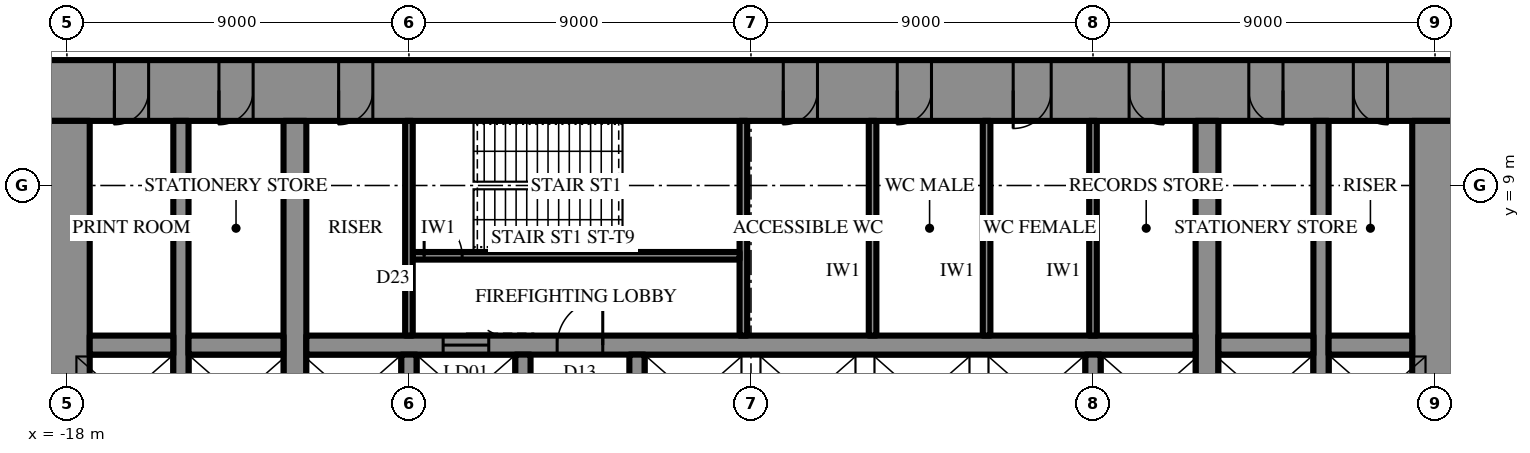
"""IFC4 building model, lengths in metres.
Left out: names, types, materials, properties, quantities, classifications, styles, units other than length and angle.
Written with IfcOpenShell. Run it as: python <this file> out.ifc"""

import sys

from ifc_helpers import new_model, si_unit, direction, frame, frame_2d, origin, place, context, subcontext, project, spatial, rectangle, extrude, element, fill, save


model = new_model("IFC4")
c1 = context("Model", 3, precision=1e-05, world=origin(), true_north=direction((0.0, 1.0)))
c2 = subcontext(c1, "Body", "Model", "MODEL_VIEW")
j1 = project(units=[si_unit("LENGTHUNIT", "METRE"), si_unit("PLANEANGLEUNIT", "RADIAN")], contexts=[c1])
p1 = place(None, origin())
s1 = spatial("IfcSite", under=j1, at=p1, CompositionType="ELEMENT")
p2 = place(p1, origin())
s2 = spatial("IfcBuilding", under=s1, at=p2, CompositionType="ELEMENT")
p3 = place(p2, frame((0.0, 0.0, 18.5)))
s3 = spatial("IfcBuildingStorey", under=s2, at=p3, CompositionType="ELEMENT", Elevation=18.5)
p4 = place(p3, frame((-18.6, 11.5, 0.0), z_axis=(0.0, 0.0, 1.0), x_axis=(1.0, 0.0, 0.0)))
e1 = element("IfcWall", 1, at=p4, inside=s3, PredefinedType="SHEAR", context=c2, shape_type="SweptSolid", body=[
    extrude(rectangle(XDim=37.2, YDim=1.6, at=frame_2d((18.6, 0.0))), origin(), (0.0, 0.0, 1.0), 5.0),
])
p5 = place(p4, frame((19.45, 0.0, 0.0)))
e2 = element("IfcOpeningElement", 2, at=p5, cuts=e1, PredefinedType="OPENING", context=c2, shape_type="SweptSolid", body=[
    extrude(rectangle(XDim=0.9, YDim=2.2, at=frame_2d((0.45, 1.1))), frame((0.0, 0.81, 0.0), z_axis=(0.0, -1.0, 0.0), x_axis=(1.0, 0.0, 0.0)), (0.0, 0.0, 1.0), 1.62),
])
p6 = place(p4, frame((22.45, 0.0, 0.0)))
e3 = element("IfcOpeningElement", 3, at=p6, cuts=e1, PredefinedType="OPENING", context=c2, shape_type="SweptSolid", body=[
    extrude(rectangle(XDim=0.9, YDim=2.2, at=frame_2d((0.45, 1.1))), frame((0.0, 0.81, 0.0), z_axis=(0.0, -1.0, 0.0), x_axis=(1.0, 0.0, 0.0)), (0.0, 0.0, 1.0), 1.62),
])
p7 = place(p4, frame((25.5, 0.0, 0.0)))
e4 = element("IfcOpeningElement", 4, at=p7, cuts=e1, PredefinedType="OPENING", context=c2, shape_type="SweptSolid", body=[
    extrude(rectangle(XDim=1.0, YDim=2.2, at=frame_2d((0.5, 1.1))), frame((0.0, 0.81, 0.0), z_axis=(0.0, -1.0, 0.0), x_axis=(1.0, 0.0, 0.0)), (0.0, 0.0, 1.0), 1.62),
])
p8 = place(p4, frame((1.85, 0.0, 0.0)))
e5 = element("IfcOpeningElement", 5, at=p8, cuts=e1, PredefinedType="OPENING", context=c2, shape_type="SweptSolid", body=[
    extrude(rectangle(XDim=0.9, YDim=2.2, at=frame_2d((0.45, 1.1))), frame((0.0, 0.81, 0.0), z_axis=(0.0, -1.0, 0.0), x_axis=(1.0, 0.0, 0.0)), (0.0, 0.0, 1.0), 1.62),
])
p9 = place(p4, frame((4.6, 0.0, 0.0)))
e6 = element("IfcOpeningElement", 6, at=p9, cuts=e1, PredefinedType="OPENING", context=c2, shape_type="SweptSolid", body=[
    extrude(rectangle(XDim=0.9, YDim=2.2, at=frame_2d((0.45, 1.1))), frame((0.0, 0.81, 0.0), z_axis=(0.0, -1.0, 0.0), x_axis=(1.0, 0.0, 0.0)), (0.0, 0.0, 1.0), 1.62),
])
p10 = place(p4, frame((7.75, 0.0, 0.0)))
e7 = element("IfcOpeningElement", 7, at=p10, cuts=e1, PredefinedType="OPENING", context=c2, shape_type="SweptSolid", body=[
    extrude(rectangle(XDim=0.9, YDim=2.2, at=frame_2d((0.45, 1.1))), frame((0.0, 0.81, 0.0), z_axis=(0.0, -1.0, 0.0), x_axis=(1.0, 0.0, 0.0)), (0.0, 0.0, 1.0), 1.62),
])
p11 = place(p4, frame((28.55, 0.0, 0.0)))
e8 = element("IfcOpeningElement", 8, at=p11, cuts=e1, PredefinedType="OPENING", context=c2, shape_type="SweptSolid", body=[
    extrude(rectangle(XDim=0.9, YDim=2.2, at=frame_2d((0.45, 1.1))), frame((0.0, 0.81, 0.0), z_axis=(0.0, -1.0, 0.0), x_axis=(1.0, 0.0, 0.0)), (0.0, 0.0, 1.0), 1.62),
])
p12 = place(p4, frame((31.7, 0.0, 0.0)))
e9 = element("IfcOpeningElement", 9, at=p12, cuts=e1, PredefinedType="OPENING", context=c2, shape_type="SweptSolid", body=[
    extrude(rectangle(XDim=0.9, YDim=2.2, at=frame_2d((0.45, 1.1))), frame((0.0, 0.81, 0.0), z_axis=(0.0, -1.0, 0.0), x_axis=(1.0, 0.0, 0.0)), (0.0, 0.0, 1.0), 1.62),
])
p13 = place(p4, frame((34.45, 0.0, 0.0)))
e10 = element("IfcOpeningElement", 10, at=p13, cuts=e1, PredefinedType="OPENING", context=c2, shape_type="SweptSolid", body=[
    extrude(rectangle(XDim=0.9, YDim=2.2, at=frame_2d((0.45, 1.1))), frame((0.0, 0.81, 0.0), z_axis=(0.0, -1.0, 0.0), x_axis=(1.0, 0.0, 0.0)), (0.0, 0.0, 1.0), 1.62),
])
p14 = place(p3, frame((18.0, -10.7, 0.0), z_axis=(0.0, 0.0, 1.0), x_axis=(0.0, 1.0, 0.0)))
e11 = element("IfcWall", 11, at=p14, inside=s3, PredefinedType="SHEAR", context=c2, shape_type="SweptSolid", body=[
    extrude(rectangle(XDim=21.4, YDim=1.2, at=frame_2d((10.7, 0.0))), origin(), (0.0, 0.0, 1.0), 5.0),
])
p15 = place(p14, frame((9.8, 0.0, 0.0)))
e12 = element("IfcOpeningElement", 12, at=p15, cuts=e11, PredefinedType="OPENING", context=c2, shape_type="SweptSolid", body=[
    extrude(rectangle(XDim=1.8, YDim=2.4, at=frame_2d((0.9, 1.2))), frame((0.0, 0.61, 0.0), z_axis=(0.0, -1.0, 0.0), x_axis=(1.0, 0.0, 0.0)), (0.0, 0.0, 1.0), 1.22),
])
p16 = place(p3, frame((-18.0, 10.7, 0.0), z_axis=(0.0, 0.0, 1.0), x_axis=(0.0, -1.0, 0.0)))
e13 = element("IfcWall", 13, at=p16, inside=s3, PredefinedType="SHEAR", context=c2, shape_type="SweptSolid", body=[
    extrude(rectangle(XDim=21.4, YDim=1.2, at=frame_2d((10.7, 0.0))), origin(), (0.0, 0.0, 1.0), 5.0),
])
p17 = place(p16, frame((9.8, 0.0, 0.0)))
e14 = element("IfcOpeningElement", 14, at=p17, cuts=e13, PredefinedType="OPENING", context=c2, shape_type="SweptSolid", body=[
    extrude(rectangle(XDim=1.8, YDim=2.4, at=frame_2d((0.9, 1.2))), frame((0.0, 0.61, 0.0), z_axis=(0.0, -1.0, 0.0), x_axis=(1.0, 0.0, 0.0)), (0.0, 0.0, 1.0), 1.22),
])
p18 = place(p3, frame((12.0, -10.7, 0.0), z_axis=(0.0, 0.0, 1.0), x_axis=(0.0, 1.0, 0.0)))
e15 = element("IfcWall", 15, at=p18, inside=s3, PredefinedType="SHEAR", context=c2, shape_type="SweptSolid", body=[
    extrude(rectangle(XDim=21.4, YDim=0.6, at=frame_2d((10.7, 0.0))), origin(), (0.0, 0.0, 1.0), 5.0),
])
p19 = place(p18, frame((9.8, 0.0, 0.0)))
e16 = element("IfcOpeningElement", 16, at=p19, cuts=e15, PredefinedType="OPENING", context=c2, shape_type="SweptSolid", body=[
    extrude(rectangle(XDim=1.8, YDim=2.4, at=frame_2d((0.9, 1.2))), frame((0.0, 0.31, 0.0), z_axis=(0.0, -1.0, 0.0), x_axis=(1.0, 0.0, 0.0)), (0.0, 0.0, 1.0), 0.62),
])
p20 = place(p3, frame((-12.0, -10.7, 0.0), z_axis=(0.0, 0.0, 1.0), x_axis=(0.0, 1.0, 0.0)))
e17 = element("IfcWall", 17, at=p20, inside=s3, PredefinedType="SHEAR", context=c2, shape_type="SweptSolid", body=[
    extrude(rectangle(XDim=21.4, YDim=0.6, at=frame_2d((10.7, 0.0))), origin(), (0.0, 0.0, 1.0), 5.0),
])
p21 = place(p20, frame((9.8, 0.0, 0.0)))
e18 = element("IfcOpeningElement", 18, at=p21, cuts=e17, PredefinedType="OPENING", context=c2, shape_type="SweptSolid", body=[
    extrude(rectangle(XDim=1.8, YDim=2.4, at=frame_2d((0.9, 1.2))), frame((0.0, 0.31, 0.0), z_axis=(0.0, -1.0, 0.0), x_axis=(1.0, 0.0, 0.0)), (0.0, 0.0, 1.0), 0.62),
])
p22 = place(p3, frame((15.0, -10.7, 0.0), z_axis=(0.0, 0.0, 1.0), x_axis=(0.0, 1.0, 0.0)))
e19 = element("IfcWall", 19, at=p22, inside=s3, PredefinedType="SHEAR", context=c2, shape_type="SweptSolid", body=[
    extrude(rectangle(XDim=21.4, YDim=0.4, at=frame_2d((10.7, 0.0))), origin(), (0.0, 0.0, 1.0), 5.0),
])
p23 = place(p22, frame((9.8, 0.0, 0.0)))
e20 = element("IfcOpeningElement", 20, at=p23, cuts=e19, PredefinedType="OPENING", context=c2, shape_type="SweptSolid", body=[
    extrude(rectangle(XDim=1.8, YDim=2.4, at=frame_2d((0.9, 1.2))), frame((0.0, 0.21, 0.0), z_axis=(0.0, -1.0, 0.0), x_axis=(1.0, 0.0, 0.0)), (0.0, 0.0, 1.0), 0.42),
])
p24 = place(p3, frame((-15.0, -10.7, 0.0), z_axis=(0.0, 0.0, 1.0), x_axis=(0.0, 1.0, 0.0)))
e21 = element("IfcWall", 21, at=p24, inside=s3, PredefinedType="SHEAR", context=c2, shape_type="SweptSolid", body=[
    extrude(rectangle(XDim=21.4, YDim=0.4, at=frame_2d((10.7, 0.0))), origin(), (0.0, 0.0, 1.0), 5.0),
])
p25 = place(p24, frame((9.8, 0.0, 0.0)))
e22 = element("IfcOpeningElement", 22, at=p25, cuts=e21, PredefinedType="OPENING", context=c2, shape_type="SweptSolid", body=[
    extrude(rectangle(XDim=1.8, YDim=2.4, at=frame_2d((0.9, 1.2))), frame((0.0, 0.21, 0.0), z_axis=(0.0, -1.0, 0.0), x_axis=(1.0, 0.0, 0.0)), (0.0, 0.0, 1.0), 0.42),
])
p26 = place(p3, frame((-17.4, 4.8, 0.0), z_axis=(0.0, 0.0, 1.0), x_axis=(1.0, 0.0, 0.0)))
e23 = element("IfcWall", 23, at=p26, inside=s3, PredefinedType="SHEAR", context=c2, shape_type="SweptSolid", body=[
    extrude(rectangle(XDim=2.2, YDim=0.5, at=frame_2d((1.1, 0.0))), origin(), (0.0, 0.0, 1.0), 5.0),
])
p27 = place(p3, frame((-14.8, 4.8, 0.0), z_axis=(0.0, 0.0, 1.0), x_axis=(1.0, 0.0, 0.0)))
e24 = element("IfcWall", 24, at=p27, inside=s3, PredefinedType="SHEAR", context=c2, shape_type="SweptSolid", body=[
    extrude(rectangle(XDim=2.5, YDim=0.5, at=frame_2d((1.25, 0.0))), origin(), (0.0, 0.0, 1.0), 5.0),
])
p28 = place(p3, frame((-11.7, 4.8, 0.0), z_axis=(0.0, 0.0, 1.0), x_axis=(1.0, 0.0, 0.0)))
e25 = element("IfcWall", 25, at=p28, inside=s3, PredefinedType="SHEAR", context=c2, shape_type="SweptSolid", body=[
    extrude(rectangle(XDim=23.4, YDim=0.5, at=frame_2d((11.7, 0.0))), origin(), (0.0, 0.0, 1.0), 5.0),
])
p29 = place(p28, frame((6.6, 0.0, 0.0)))
e26 = element("IfcOpeningElement", 26, at=p29, cuts=e25, PredefinedType="OPENING", context=c2, shape_type="SweptSolid", body=[
    extrude(rectangle(XDim=1.2, YDim=2.2, at=frame_2d((0.6, 1.1))), frame((0.0, 0.26, 0.0), z_axis=(0.0, -1.0, 0.0), x_axis=(1.0, 0.0, 0.0)), (0.0, 0.0, 1.0), 0.52),
])
p30 = place(p28, frame((3.6, 0.0, 0.0)))
e27 = element("IfcOpeningElement", 27, at=p30, cuts=e25, PredefinedType="OPENING", context=c2, shape_type="SweptSolid", body=[
    extrude(rectangle(XDim=1.2, YDim=2.2, at=frame_2d((0.6, 1.1))), frame((0.0, 0.26, 0.0), z_axis=(0.0, -1.0, 0.0), x_axis=(1.0, 0.0, 0.0)), (0.0, 0.0, 1.0), 0.52),
])
p31 = place(p3, frame((12.3, 4.8, 0.0), z_axis=(0.0, 0.0, 1.0), x_axis=(1.0, 0.0, 0.0)))
e28 = element("IfcWall", 28, at=p31, inside=s3, PredefinedType="SHEAR", context=c2, shape_type="SweptSolid", body=[
    extrude(rectangle(XDim=2.5, YDim=0.5, at=frame_2d((1.25, 0.0))), origin(), (0.0, 0.0, 1.0), 5.0),
])
p32 = place(p3, frame((15.2, 4.8, 0.0), z_axis=(0.0, 0.0, 1.0), x_axis=(1.0, 0.0, 0.0)))
e29 = element("IfcWall", 29, at=p32, inside=s3, PredefinedType="SHEAR", context=c2, shape_type="SweptSolid", body=[
    extrude(rectangle(XDim=2.2, YDim=0.5, at=frame_2d((1.1, 0.0))), origin(), (0.0, 0.0, 1.0), 5.0),
])
for number, where, z_axis, x_axis in (
    (30, (-9.0, 2.25, 0.0), (0.0, 0.0, 1.0), (0.0, 1.0, 0.0)),
    (31, (-6.0, 2.25, 0.0), (0.0, 0.0, 1.0), (0.0, 1.0, 0.0)),
    (32, (-3.0, 2.25, 0.0), (0.0, 0.0, 1.0), (0.0, 1.0, 0.0)),
    (33, (9.0, 2.25, 0.0), (0.0, 0.0, 1.0), (0.0, 1.0, 0.0)),
):
    element("IfcWall", number, at=place(p3, frame(where, z_axis=z_axis, x_axis=x_axis)), inside=s3, PredefinedType="SHEAR", context=c2, shape_type="SweptSolid", body=[
        extrude(rectangle(XDim=2.3, YDim=0.4, at=frame_2d((1.15, 0.0))), origin(), (0.0, 0.0, 1.0), 5.0),
    ])
p33 = place(p3, frame((-0.2, 5.05, 0.0), z_axis=(0.0, 0.0, 1.0), x_axis=(0.0, 1.0, 0.0)))
e34 = element("IfcWall", 34, at=p33, inside=s3, PredefinedType="SHEAR", context=c2, shape_type="SweptSolid", body=[
    extrude(rectangle(XDim=5.65, YDim=0.2, at=frame_2d((2.825, 0.0))), origin(), (0.0, 0.0, 1.0), 5.0),
])
p34 = place(p3, frame((-8.9, 7.15, 0.0), z_axis=(0.0, 0.0, 1.0), x_axis=(1.0, 0.0, 0.0)))
e35 = element("IfcWall", 35, at=p34, inside=s3, PredefinedType="SHEAR", context=c2, shape_type="SweptSolid", body=[
    extrude(rectangle(XDim=8.6, YDim=0.2, at=frame_2d((4.3, 0.0))), origin(), (0.0, 0.0, 1.0), 5.0),
])
p35 = place(p34, frame((0.3, 0.0, 0.0)))
e36 = element("IfcOpeningElement", 36, at=p35, cuts=e35, PredefinedType="OPENING", context=c2, shape_type="SweptSolid", body=[
    extrude(rectangle(XDim=1.0, YDim=2.2, at=frame_2d((0.5, 1.1))), frame((0.0, 0.11, 0.0), z_axis=(0.0, -1.0, 0.0), x_axis=(1.0, 0.0, 0.0)), (0.0, 0.0, 1.0), 0.22),
])
for number, where, z_axis, x_axis in (
    (37, (-9.0, 5.05, 0.0), (0.0, 0.0, 1.0), (0.0, 1.0, 0.0)),
    (38, (9.0, 5.05, 0.0), (0.0, 0.0, 1.0), (0.0, 1.0, 0.0)),
    (39, (3.2, 5.05, 0.0), (0.0, 0.0, 1.0), (0.0, 1.0, 0.0)),
    (40, (6.2, 5.05, 0.0), (0.0, 0.0, 1.0), (0.0, 1.0, 0.0)),
):
    element("IfcWall", number, at=place(p3, frame(where, z_axis=z_axis, x_axis=x_axis)), inside=s3, PredefinedType="PARTITIONING", context=c2, shape_type="SweptSolid", body=[
        extrude(rectangle(XDim=5.65, YDim=0.2, at=frame_2d((2.825, 0.0))), origin(), (0.0, 0.0, 1.0), 4.65),
    ])
p36 = place(p29, origin())
e41 = element("IfcDoor", 41, at=p36, inside=s3, OperationType="SINGLE_SWING_LEFT", PredefinedType="DOOR", context=c2, shape_type="SweptSolid", body=[
    extrude(rectangle(XDim=1.2, YDim=2.2, at=frame_2d((0.6, 1.1))), frame((0.0, 0.025, 0.0), z_axis=(0.0, -1.0, 0.0), x_axis=(1.0, 0.0, 0.0)), (0.0, 0.0, 1.0), 0.05),
])
fill(e26, e41)
p37 = place(p35, origin())
e42 = element("IfcDoor", 42, at=p37, inside=s3, OperationType="SINGLE_SWING_RIGHT", PredefinedType="DOOR", context=c2, shape_type="SweptSolid", body=[
    extrude(rectangle(XDim=1.0, YDim=2.2, at=frame_2d((0.5, 1.1))), frame((0.0, 0.025, 0.0), z_axis=(0.0, -1.0, 0.0), x_axis=(1.0, 0.0, 0.0)), (0.0, 0.0, 1.0), 0.05),
])
fill(e36, e42)
p38 = place(p5, frame((0.9, 0.0, 0.0), z_axis=(0.0, 0.0, 1.0), x_axis=(-1.0, 0.0, 0.0)))
e43 = element("IfcDoor", 43, at=p38, inside=s3, OperationType="SINGLE_SWING_LEFT", PredefinedType="DOOR", context=c2, shape_type="SweptSolid", body=[
    extrude(rectangle(XDim=0.9, YDim=2.2, at=frame_2d((0.45, 1.1))), frame((0.0, 0.025, 0.0), z_axis=(0.0, -1.0, 0.0), x_axis=(1.0, 0.0, 0.0)), (0.0, 0.0, 1.0), 0.05),
])
fill(e2, e43)
p39 = place(p6, frame((0.9, 0.0, 0.0), z_axis=(0.0, 0.0, 1.0), x_axis=(-1.0, 0.0, 0.0)))
e44 = element("IfcDoor", 44, at=p39, inside=s3, OperationType="SINGLE_SWING_LEFT", PredefinedType="DOOR", context=c2, shape_type="SweptSolid", body=[
    extrude(rectangle(XDim=0.9, YDim=2.2, at=frame_2d((0.45, 1.1))), frame((0.0, 0.025, 0.0), z_axis=(0.0, -1.0, 0.0), x_axis=(1.0, 0.0, 0.0)), (0.0, 0.0, 1.0), 0.05),
])
fill(e3, e44)
p40 = place(p7, frame((1.0, 0.0, 0.0), z_axis=(0.0, 0.0, 1.0), x_axis=(-1.0, 0.0, 0.0)))
e45 = element("IfcDoor", 45, at=p40, inside=s3, OperationType="SINGLE_SWING_LEFT", PredefinedType="DOOR", context=c2, shape_type="SweptSolid", body=[
    extrude(rectangle(XDim=1.0, YDim=2.2, at=frame_2d((0.5, 1.1))), frame((0.0, 0.025, 0.0), z_axis=(0.0, -1.0, 0.0), x_axis=(1.0, 0.0, 0.0)), (0.0, 0.0, 1.0), 0.05),
])
fill(e4, e45)
p41 = place(p8, frame((0.9, 0.0, 0.0), z_axis=(0.0, 0.0, 1.0), x_axis=(-1.0, 0.0, 0.0)))
e46 = element("IfcDoor", 46, at=p41, inside=s3, OperationType="SINGLE_SWING_LEFT", PredefinedType="DOOR", context=c2, shape_type="SweptSolid", body=[
    extrude(rectangle(XDim=0.9, YDim=2.2, at=frame_2d((0.45, 1.1))), frame((0.0, 0.025, 0.0), z_axis=(0.0, -1.0, 0.0), x_axis=(1.0, 0.0, 0.0)), (0.0, 0.0, 1.0), 0.05),
])
fill(e5, e46)
p42 = place(p9, frame((0.9, 0.0, 0.0), z_axis=(0.0, 0.0, 1.0), x_axis=(-1.0, 0.0, 0.0)))
e47 = element("IfcDoor", 47, at=p42, inside=s3, OperationType="SINGLE_SWING_LEFT", PredefinedType="DOOR", context=c2, shape_type="SweptSolid", body=[
    extrude(rectangle(XDim=0.9, YDim=2.2, at=frame_2d((0.45, 1.1))), frame((0.0, 0.025, 0.0), z_axis=(0.0, -1.0, 0.0), x_axis=(1.0, 0.0, 0.0)), (0.0, 0.0, 1.0), 0.05),
])
fill(e6, e47)
p43 = place(p10, frame((0.9, 0.0, 0.0), z_axis=(0.0, 0.0, 1.0), x_axis=(-1.0, 0.0, 0.0)))
e48 = element("IfcDoor", 48, at=p43, inside=s3, OperationType="SINGLE_SWING_LEFT", PredefinedType="DOOR", context=c2, shape_type="SweptSolid", body=[
    extrude(rectangle(XDim=0.9, YDim=2.2, at=frame_2d((0.45, 1.1))), frame((0.0, 0.025, 0.0), z_axis=(0.0, -1.0, 0.0), x_axis=(1.0, 0.0, 0.0)), (0.0, 0.0, 1.0), 0.05),
])
fill(e7, e48)
p44 = place(p11, frame((0.9, 0.0, 0.0), z_axis=(0.0, 0.0, 1.0), x_axis=(-1.0, 0.0, 0.0)))
e49 = element("IfcDoor", 49, at=p44, inside=s3, OperationType="SINGLE_SWING_RIGHT", PredefinedType="DOOR", context=c2, shape_type="SweptSolid", body=[
    extrude(rectangle(XDim=0.9, YDim=2.2, at=frame_2d((0.45, 1.1))), frame((0.0, 0.025, 0.0), z_axis=(0.0, -1.0, 0.0), x_axis=(1.0, 0.0, 0.0)), (0.0, 0.0, 1.0), 0.05),
])
fill(e8, e49)
p45 = place(p12, frame((0.9, 0.0, 0.0), z_axis=(0.0, 0.0, 1.0), x_axis=(-1.0, 0.0, 0.0)))
e50 = element("IfcDoor", 50, at=p45, inside=s3, OperationType="SINGLE_SWING_RIGHT", PredefinedType="DOOR", context=c2, shape_type="SweptSolid", body=[
    extrude(rectangle(XDim=0.9, YDim=2.2, at=frame_2d((0.45, 1.1))), frame((0.0, 0.025, 0.0), z_axis=(0.0, -1.0, 0.0), x_axis=(1.0, 0.0, 0.0)), (0.0, 0.0, 1.0), 0.05),
])
fill(e9, e50)
p46 = place(p13, frame((0.9, 0.0, 0.0), z_axis=(0.0, 0.0, 1.0), x_axis=(-1.0, 0.0, 0.0)))
e51 = element("IfcDoor", 51, at=p46, inside=s3, OperationType="SINGLE_SWING_RIGHT", PredefinedType="DOOR", context=c2, shape_type="SweptSolid", body=[
    extrude(rectangle(XDim=0.9, YDim=2.2, at=frame_2d((0.45, 1.1))), frame((0.0, 0.025, 0.0), z_axis=(0.0, -1.0, 0.0), x_axis=(1.0, 0.0, 0.0)), (0.0, 0.0, 1.0), 0.05),
])
fill(e10, e51)
p47 = place(p30, origin())
e52 = element("IfcDoor", 52, at=p47, inside=s3, OperationType="SLIDING_TO_LEFT", PredefinedType="DOOR", context=c2, shape_type="SweptSolid", body=[
    extrude(rectangle(XDim=1.2, YDim=2.2, at=frame_2d((0.6, 1.1))), frame((0.0, 0.025, 0.0), z_axis=(0.0, -1.0, 0.0), x_axis=(1.0, 0.0, 0.0)), (0.0, 0.0, 1.0), 0.05),
])
fill(e27, e52)
save(model, sys.argv[1])
